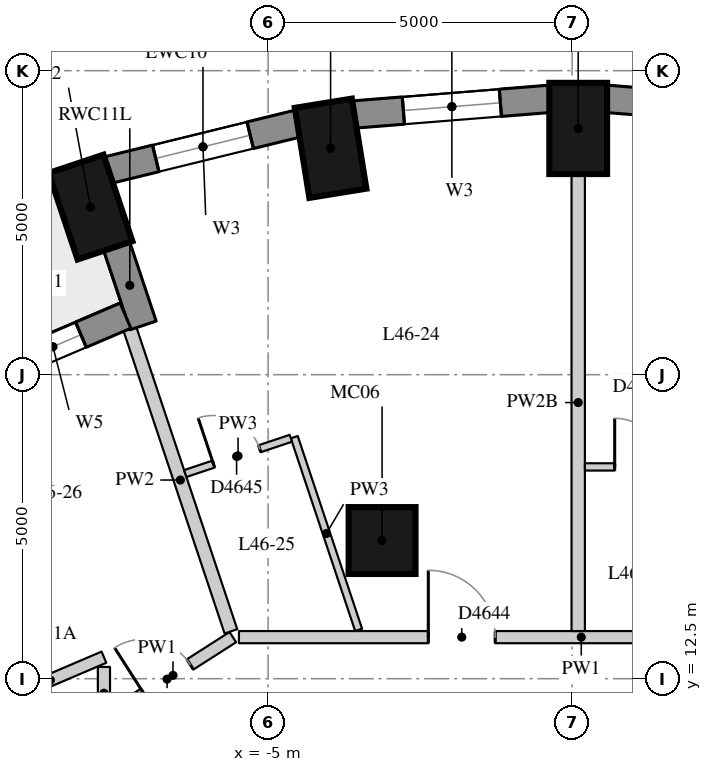
"""IFC4 building model, lengths in metres.
Left out: names, types, materials, properties, quantities, classifications, styles, units other than length and angle.
Written with IfcOpenShell. Run it as: python <this file> out.ifc"""

import sys

from ifc_helpers import new_model, si_unit, direction, frame, frame_2d, origin, origin_2d, place, context, subcontext, project, spatial, rectangle, extrude, element, fill, save


model = new_model("IFC4")
c1 = context("Model", 3, precision=1e-05, world=origin(), true_north=direction((0.0, 1.0)))
c2 = subcontext(c1, "Body", "Model", "MODEL_VIEW")
j1 = project(units=[si_unit("LENGTHUNIT", "METRE"), si_unit("PLANEANGLEUNIT", "RADIAN")], contexts=[c1])
p1 = place(None, origin())
s1 = spatial("IfcSite", under=j1, at=p1, CompositionType="ELEMENT")
p2 = place(p1, origin())
s2 = spatial("IfcBuilding", under=s1, at=p2, CompositionType="ELEMENT")
p3 = place(p2, frame((0.0, 0.0, 164.9)))
s3 = spatial("IfcBuildingStorey", under=s2, at=p3, CompositionType="ELEMENT", Elevation=164.9)
for number, where, z_axis, x_axis in (
    (1, (0.1, 21.55, 0.0), (0.0, 0.0, 1.0), (0.0, 1.0, 0.0)),
    (2, (-3.972, 21.224, 0.0), (0.0, 0.0, 1.0), (-0.16, 0.987, 0.0)),
    (3, (-7.92, 20.256, 0.0), (0.0, 0.0, 1.0), (-0.317, 0.949, 0.0)),
):
    element("IfcColumn", number, at=place(p3, frame(where, z_axis=z_axis, x_axis=x_axis)), inside=s3, PredefinedType="COLUMN", context=c2, shape_type="SweptSolid", body=[
        extrude(rectangle(XDim=1.5, YDim=0.95, at=origin_2d()), origin(), (0.0, 0.0, 1.0), 3.3),
    ])
p4 = place(p3, frame((-3.126, 14.772, 0.0), z_axis=(0.0, 0.0, 1.0), x_axis=(1.0, 0.0, 0.0)))
e4 = element("IfcColumn", 4, at=p4, inside=s3, PredefinedType="COLUMN", context=c2, shape_type="SweptSolid", body=[
    extrude(rectangle(XDim=1.1, YDim=1.1, at=origin_2d()), origin(), (0.0, 0.0, 1.0), 3.3),
])
p5 = place(p3, frame((3.801, 21.778, 0.0), z_axis=(0.0, 0.0, 1.0), x_axis=(-0.996812416891, 0.079780984773, 0.0)))
e5 = element("IfcWall", 5, at=p5, inside=s3, PredefinedType="SOLIDWALL", context=c2, shape_type="SweptSolid", body=[
    extrude(rectangle(XDim=3.256, YDim=0.45, at=frame_2d((1.628, 0.0))), origin(), (0.0, 0.0, 1.0), 3.02),
])
p6 = place(p5, frame((0.828, 0.0, 0.4)))
e6 = element("IfcOpeningElement", 6, at=p6, cuts=e5, PredefinedType="OPENING", context=c2, shape_type="SweptSolid", body=[
    extrude(rectangle(XDim=1.6, YDim=1.75, at=frame_2d((0.8, 0.875))), frame((0.0, 0.235, 0.0), z_axis=(0.0, -1.0, 0.0), x_axis=(1.0, 0.0, 0.0)), (0.0, 0.0, 1.0), 0.47),
])
p7 = place(p3, frame((-0.355, 22.038, 0.0), z_axis=(0.0, 0.0, 1.0), x_axis=(-0.996812416891, -0.079780984773, 0.0)))
e7 = element("IfcWall", 7, at=p7, inside=s3, PredefinedType="SOLIDWALL", context=c2, shape_type="SweptSolid", body=[
    extrude(rectangle(XDim=3.256, YDim=0.45, at=frame_2d((1.628, 0.0))), origin(), (0.0, 0.0, 1.0), 3.02),
])
p8 = place(p7, frame((0.828, 0.0, 0.4)))
e8 = element("IfcOpeningElement", 8, at=p8, cuts=e7, PredefinedType="OPENING", context=c2, shape_type="SweptSolid", body=[
    extrude(rectangle(XDim=1.6, YDim=1.75, at=frame_2d((0.8, 0.875))), frame((0.0, 0.235, 0.0), z_axis=(0.0, -1.0, 0.0), x_axis=(1.0, 0.0, 0.0)), (0.0, 0.0, 1.0), 0.47),
])
p9 = place(p3, frame((-4.499, 21.633, 0.0), z_axis=(0.0, 0.0, 1.0), x_axis=(-0.971232901476, -0.238131583563, 0.0)))
e9 = element("IfcWall", 9, at=p9, inside=s3, PredefinedType="SOLIDWALL", context=c2, shape_type="SweptSolid", body=[
    extrude(rectangle(XDim=3.237, YDim=0.45, at=frame_2d((1.618, 0.0))), origin(), (0.0, 0.0, 1.0), 3.02),
])
p10 = place(p9, frame((0.818, 0.0, 0.4)))
e10 = element("IfcOpeningElement", 10, at=p10, cuts=e9, PredefinedType="OPENING", context=c2, shape_type="SweptSolid", body=[
    extrude(rectangle(XDim=1.6, YDim=1.75, at=frame_2d((0.8, 0.875))), frame((0.0, 0.235, 0.0), z_axis=(0.0, -1.0, 0.0), x_axis=(1.0, 0.0, 0.0)), (0.0, 0.0, 1.0), 0.47),
])
p11 = place(p3, frame((-7.495, 19.629, 0.0), z_axis=(0.0, 0.0, 1.0), x_axis=(0.316754470825, -0.948507567293, 0.0)))
e11 = element("IfcWall", 11, at=p11, inside=s3, PredefinedType="SOLIDWALL", context=c2, shape_type="SweptSolid", body=[
    extrude(rectangle(XDim=1.39, YDim=0.45, at=frame_2d((0.695, 0.0))), origin(), (0.0, 0.0, 1.0), 3.02),
])
p12 = place(p3, frame((-7.345, 18.47, 0.0), z_axis=(0.0, 0.0, 1.0), x_axis=(-0.919454986573, -0.393195279304, 0.0)))
e12 = element("IfcWall", 12, at=p12, inside=s3, PredefinedType="SOLIDWALL", context=c2, shape_type="SweptSolid", body=[
    extrude(rectangle(XDim=3.745, YDim=0.45, at=frame_2d((1.872, 0.0))), origin(), (0.0, 0.0, 1.0), 3.02),
])
p13 = place(p12, frame((0.797, 0.0, 0.4)))
e13 = element("IfcOpeningElement", 13, at=p13, cuts=e12, PredefinedType="OPENING", context=c2, shape_type="SweptSolid", body=[
    extrude(rectangle(XDim=1.0, YDim=1.75, at=frame_2d((0.5, 0.875))), frame((0.0, 0.235, 0.0), z_axis=(0.0, -1.0, 0.0), x_axis=(1.0, 0.0, 0.0)), (0.0, 0.0, 1.0), 0.47),
])
p14 = place(p12, frame((1.947, 0.0, 0.0)))
e14 = element("IfcOpeningElement", 14, at=p14, cuts=e12, PredefinedType="OPENING", context=c2, shape_type="SweptSolid", body=[
    extrude(rectangle(XDim=1.0, YDim=2.15, at=frame_2d((0.5, 1.075))), frame((0.0, 0.235, 0.0), z_axis=(0.0, -1.0, 0.0), x_axis=(1.0, 0.0, 0.0)), (0.0, 0.0, 1.0), 0.47),
])
p15 = place(p3, frame((-9.46, 12.101, 0.0), z_axis=(0.0, 0.0, 1.0), x_axis=(0.919441549003, 0.393226700475, 0.0)))
e15 = element("IfcWall", 15, at=p15, inside=s3, PredefinedType="PARTITIONING", context=c2, shape_type="SweptSolid", body=[
    extrude(rectangle(XDim=1.915, YDim=0.2, at=frame_2d((0.958, 0.0))), origin(), (0.0, 0.0, 1.0), 2.57),
])
p16 = place(p3, frame((-7.7, 12.693, 0.0), z_axis=(0.0, 0.0, 1.0), x_axis=(0.0, -1.0, 0.0)))
e16 = element("IfcWall", 16, at=p16, inside=s3, PredefinedType="PARTITIONING", context=c2, shape_type="SweptSolid", body=[
    extrude(rectangle(XDim=0.864, YDim=0.2, at=frame_2d((0.432, 0.0))), origin(), (0.0, 0.0, 1.0), 3.02),
])
p17 = place(p3, frame((-7.548, 11.926, 0.0), z_axis=(0.0, 0.0, 1.0), x_axis=(0.842760799664, 0.538288244855, 0.0)))
e17 = element("IfcWall", 17, at=p17, inside=s3, PredefinedType="PARTITIONING", context=c2, shape_type="SweptSolid", body=[
    extrude(rectangle(XDim=2.336, YDim=0.2, at=frame_2d((1.168, 0.0))), origin(), (0.0, 0.0, 1.0), 3.02),
])
p18 = place(p17, frame((0.602, 0.0, 0.0)))
e18 = element("IfcOpeningElement", 18, at=p18, cuts=e17, PredefinedType="OPENING", context=c2, shape_type="SweptSolid", body=[
    extrude(rectangle(XDim=0.9, YDim=2.1, at=frame_2d((0.45, 1.05))), frame((0.0, 0.11, 0.0), z_axis=(0.0, -1.0, 0.0), x_axis=(1.0, 0.0, 0.0)), (0.0, 0.0, 1.0), 0.22),
])
p19 = place(p3, frame((-5.48, 13.183, 0.0), z_axis=(0.0, 0.0, 1.0), x_axis=(1.0, 0.0, 0.0)))
e19 = element("IfcWall", 19, at=p19, inside=s3, PredefinedType="PARTITIONING", context=c2, shape_type="SweptSolid", body=[
    extrude(rectangle(XDim=11.26, YDim=0.2, at=frame_2d((5.63, 0.0))), origin(), (0.0, 0.0, 1.0), 3.02),
])
p20 = place(p19, frame((9.368, 0.0, 0.0)))
e20 = element("IfcOpeningElement", 20, at=p20, cuts=e19, PredefinedType="OPENING", context=c2, shape_type="SweptSolid", body=[
    extrude(rectangle(XDim=1.1, YDim=2.1, at=frame_2d((0.55, 1.05))), frame((0.0, 0.11, 0.0), z_axis=(0.0, -1.0, 0.0), x_axis=(1.0, 0.0, 0.0)), (0.0, 0.0, 1.0), 0.22),
])
p21 = place(p19, frame((3.115, 0.0, 0.0)))
e21 = element("IfcOpeningElement", 21, at=p21, cuts=e19, PredefinedType="OPENING", context=c2, shape_type="SweptSolid", body=[
    extrude(rectangle(XDim=1.1, YDim=2.1, at=frame_2d((0.55, 1.05))), frame((0.0, 0.11, 0.0), z_axis=(0.0, -1.0, 0.0), x_axis=(1.0, 0.0, 0.0)), (0.0, 0.0, 1.0), 0.22),
])
p22 = place(p3, frame((0.1, 20.8, 0.0), z_axis=(0.0, 0.0, 1.0), x_axis=(0.0, -1.0, 0.0)))
e22 = element("IfcWall", 22, at=p22, inside=s3, PredefinedType="PARTITIONING", context=c2, shape_type="SweptSolid", body=[
    extrude(rectangle(XDim=7.517, YDim=0.22, at=frame_2d((3.758, 0.0))), origin(), (0.0, 0.0, 1.0), 2.57),
])
p23 = place(p3, frame((-7.274, 18.256, 0.0), z_axis=(0.0, 0.0, 1.0), x_axis=(0.316758050248, -0.948506371936, 0.0)))
e23 = element("IfcWall", 23, at=p23, inside=s3, PredefinedType="PARTITIONING", context=c2, shape_type="SweptSolid", body=[
    extrude(rectangle(XDim=5.248, YDim=0.22, at=frame_2d((2.624, 0.0))), origin(), (0.0, 0.0, 1.0), 3.02),
])
p24 = place(p3, frame((-3.511, 13.302, 0.0), z_axis=(0.0, 0.0, 1.0), x_axis=(-0.316666024344, 0.948537099447, 0.0)))
e24 = element("IfcWall", 24, at=p24, inside=s3, PredefinedType="PARTITIONING", context=c2, shape_type="SweptSolid", body=[
    extrude(rectangle(XDim=3.342, YDim=0.12, at=frame_2d((1.671, 0.0))), origin(), (0.0, 0.0, 1.0), 3.02),
])
p25 = place(p3, frame((2.04, 15.983, 0.0), z_axis=(0.0, 0.0, 1.0), x_axis=(-1.0, 0.0, 0.0)))
e25 = element("IfcWall", 25, at=p25, inside=s3, PredefinedType="PARTITIONING", context=c2, shape_type="SweptSolid", body=[
    extrude(rectangle(XDim=1.83, YDim=0.12, at=frame_2d((0.915, 0.0))), origin(), (0.0, 0.0, 1.0), 3.02),
])
p26 = place(p25, frame((0.54, 0.0, 0.0)))
e26 = element("IfcOpeningElement", 26, at=p26, cuts=e25, PredefinedType="OPENING", context=c2, shape_type="SweptSolid", body=[
    extrude(rectangle(XDim=0.8, YDim=2.1, at=frame_2d((0.4, 1.05))), frame((0.0, 0.07, 0.0), z_axis=(0.0, -1.0, 0.0), x_axis=(1.0, 0.0, 0.0)), (0.0, 0.0, 1.0), 0.14),
])
p27 = place(p3, frame((-4.626, 16.454, 0.0), z_axis=(0.0, 0.0, 1.0), x_axis=(-0.9485230882, -0.31670799035, 0.0)))
e27 = element("IfcWall", 27, at=p27, inside=s3, PredefinedType="PARTITIONING", context=c2, shape_type="SweptSolid", body=[
    extrude(rectangle(XDim=1.83, YDim=0.12, at=frame_2d((0.915, 0.0))), origin(), (0.0, 0.0, 1.0), 3.02),
])
p28 = place(p27, frame((0.54, 0.0, 0.0)))
e28 = element("IfcOpeningElement", 28, at=p28, cuts=e27, PredefinedType="OPENING", context=c2, shape_type="SweptSolid", body=[
    extrude(rectangle(XDim=0.8, YDim=2.1, at=frame_2d((0.4, 1.05))), frame((0.0, 0.07, 0.0), z_axis=(0.0, -1.0, 0.0), x_axis=(1.0, 0.0, 0.0)), (0.0, 0.0, 1.0), 0.14),
])
p29 = place(p8, origin())
e29 = element("IfcWindow", 29, at=p29, inside=s3, PartitioningType="SINGLE_PANEL", PredefinedType="WINDOW", context=c2, shape_type="SweptSolid", body=[
    extrude(rectangle(XDim=1.6, YDim=1.75, at=frame_2d((0.8, 0.875))), frame((0.0, 0.035, 0.0), z_axis=(0.0, -1.0, 0.0), x_axis=(1.0, 0.0, 0.0)), (0.0, 0.0, 1.0), 0.06),
])
fill(e8, e29)
p30 = place(p10, origin())
e30 = element("IfcWindow", 30, at=p30, inside=s3, PartitioningType="SINGLE_PANEL", PredefinedType="WINDOW", context=c2, shape_type="SweptSolid", body=[
    extrude(rectangle(XDim=1.6, YDim=1.75, at=frame_2d((0.8, 0.875))), frame((0.0, 0.035, 0.0), z_axis=(0.0, -1.0, 0.0), x_axis=(1.0, 0.0, 0.0)), (0.0, 0.0, 1.0), 0.06),
])
fill(e10, e30)
p31 = place(p13, origin())
e31 = element("IfcWindow", 31, at=p31, inside=s3, PartitioningType="SINGLE_PANEL", PredefinedType="WINDOW", context=c2, shape_type="SweptSolid", body=[
    extrude(rectangle(XDim=1.0, YDim=1.75, at=frame_2d((0.5, 0.875))), frame((0.0, 0.035, 0.0), z_axis=(0.0, -1.0, 0.0), x_axis=(1.0, 0.0, 0.0)), (0.0, 0.0, 1.0), 0.06),
])
fill(e13, e31)
p32 = place(p26, origin())
e32 = element("IfcDoor", 32, at=p32, inside=s3, OperationType="SINGLE_SWING_LEFT", PredefinedType="DOOR", context=c2, shape_type="SweptSolid", body=[
    extrude(rectangle(XDim=0.8, YDim=2.1, at=frame_2d((0.4, 1.05))), frame((0.0, 0.025, 0.0), z_axis=(0.0, -1.0, 0.0), x_axis=(1.0, 0.0, 0.0)), (0.0, 0.0, 1.0), 0.05),
])
fill(e26, e32)
p33 = place(p21, origin())
e33 = element("IfcDoor", 33, at=p33, inside=s3, OperationType="SINGLE_SWING_LEFT", PredefinedType="DOOR", context=c2, shape_type="SweptSolid", body=[
    extrude(rectangle(XDim=1.1, YDim=2.1, at=frame_2d((0.55, 1.05))), frame((0.0, 0.025, 0.0), z_axis=(0.0, -1.0, 0.0), x_axis=(1.0, 0.0, 0.0)), (0.0, 0.0, 1.0), 0.05),
])
fill(e21, e33)
p34 = place(p28, origin())
e34 = element("IfcDoor", 34, at=p34, inside=s3, OperationType="SINGLE_SWING_LEFT", PredefinedType="DOOR", context=c2, shape_type="SweptSolid", body=[
    extrude(rectangle(XDim=0.8, YDim=2.1, at=frame_2d((0.4, 1.05))), frame((0.0, 0.025, 0.0), z_axis=(0.0, -1.0, 0.0), x_axis=(1.0, 0.0, 0.0)), (0.0, 0.0, 1.0), 0.05),
])
fill(e28, e34)
p35 = place(p18, origin())
e35 = element("IfcDoor", 35, at=p35, inside=s3, OperationType="SINGLE_SWING_LEFT", PredefinedType="DOOR", context=c2, shape_type="SweptSolid", body=[
    extrude(rectangle(XDim=0.9, YDim=2.1, at=frame_2d((0.45, 1.05))), frame((0.0, 0.025, 0.0), z_axis=(0.0, -1.0, 0.0), x_axis=(1.0, 0.0, 0.0)), (0.0, 0.0, 1.0), 0.05),
])
fill(e18, e35)
save(model, sys.argv[1])
